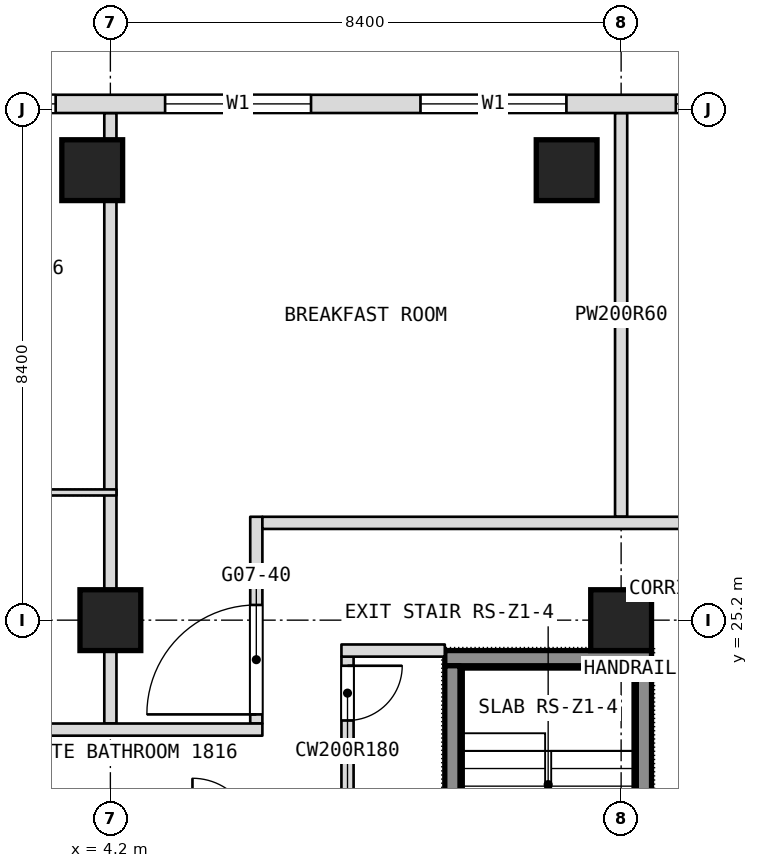
"""IFC4 building model, lengths in metres.
Left out: names, types, materials, properties, quantities, classifications, styles, units other than length and angle.
Written with IfcOpenShell. Run it as: python <this file> out.ifc"""

import sys

from ifc_helpers import new_model, si_unit, direction, frame, frame_2d, origin, origin_2d, place, context, subcontext, project, spatial, rectangle, extrude, element, fill, save


model = new_model("IFC4")
c1 = context("Model", 3, precision=1e-05, world=origin(), true_north=direction((0.0, 1.0)))
c2 = subcontext(c1, "Body", "Model", "MODEL_VIEW")
j1 = project(units=[si_unit("LENGTHUNIT", "METRE"), si_unit("PLANEANGLEUNIT", "RADIAN")], contexts=[c1])
p1 = place(None, origin())
s1 = spatial("IfcSite", under=j1, at=p1, CompositionType="ELEMENT")
p2 = place(p1, origin())
s2 = spatial("IfcBuilding", under=s1, at=p2, CompositionType="ELEMENT")
p3 = place(p2, frame((0.0, 0.0, 79.7)))
s3 = spatial("IfcBuildingStorey", under=s2, at=p3, CompositionType="ELEMENT", Elevation=79.7)
for number, where, z_axis, x_axis in (
    (1, (4.2, 25.2, 0.0), (0.0, 0.0, 1.0), (1.0, 0.0, 0.0)),
    (2, (12.6, 25.2, 0.0), (0.0, 0.0, 1.0), (1.0, 0.0, 0.0)),
    (3, (3.901, 32.6, 0.0), (0.0, 0.0, 1.0), (1.0, 0.0, 0.0)),
    (4, (11.704, 32.6, 0.0), (0.0, 0.0, 1.0), (1.0, 0.0, 0.0)),
):
    element("IfcColumn", number, at=place(p3, frame(where, z_axis=z_axis, x_axis=x_axis)), inside=s3, PredefinedType="COLUMN", context=c2, shape_type="SweptSolid", body=[
        extrude(rectangle(XDim=1.0, YDim=1.0, at=origin_2d()), origin(), (0.0, 0.0, 1.0), 3.6),
    ])
p4 = place(p3, frame((12.6, 26.9, 0.0), z_axis=(0.0, 0.0, 1.0), x_axis=(0.0, 1.0, 0.0)))
e5 = element("IfcWall", 5, at=p4, inside=s3, PredefinedType="PARTITIONING", context=c2, shape_type="SweptSolid", body=[
    extrude(rectangle(XDim=6.64, YDim=0.2, at=frame_2d((3.32, 0.0))), origin(), (0.0, 0.0, 1.0), 3.34),
])
p5 = place(p3, frame((8.1, 21.5, 0.0), z_axis=(0.0, 0.0, 1.0), x_axis=(0.0, 1.0, 0.0)))
e6 = element("IfcWall", 6, at=p5, inside=s3, PredefinedType="PARTITIONING", context=c2, shape_type="SweptSolid", body=[
    extrude(rectangle(XDim=3.1, YDim=0.2, at=frame_2d((1.55, 0.0))), origin(), (0.0, 0.0, 1.0), 3.34),
])
p6 = place(p5, frame((2.05, 0.0, 0.0)))
e7 = element("IfcOpeningElement", 7, at=p6, cuts=e6, PredefinedType="OPENING", context=c2, shape_type="SweptSolid", body=[
    extrude(rectangle(XDim=0.9, YDim=2.1, at=frame_2d((0.45, 1.05))), frame((0.0, 0.1, 0.0), z_axis=(0.0, -1.0, 0.0), x_axis=(1.0, 0.0, 0.0)), (0.0, 0.0, 1.0), 0.2),
])
p7 = place(p3, frame((6.6, 23.5, 0.0), z_axis=(0.0, 0.0, 1.0), x_axis=(0.0, 1.0, 0.0)))
e8 = element("IfcWall", 8, at=p7, inside=s3, PredefinedType="PARTITIONING", context=c2, shape_type="SweptSolid", body=[
    extrude(rectangle(XDim=3.4, YDim=0.2, at=frame_2d((1.7, 0.0))), origin(), (0.0, 0.0, 1.0), 3.34),
])
p8 = place(p7, frame((0.15, 0.0, 0.0)))
e9 = element("IfcOpeningElement", 9, at=p8, cuts=e8, PredefinedType="OPENING", context=c2, shape_type="SweptSolid", body=[
    extrude(rectangle(XDim=1.8, YDim=2.1, at=frame_2d((0.9, 1.05))), frame((0.0, 0.1, 0.0), z_axis=(0.0, -1.0, 0.0), x_axis=(1.0, 0.0, 0.0)), (0.0, 0.0, 1.0), 0.2),
])
p9 = place(p3, frame((4.2, 23.5, 0.0), z_axis=(0.0, 0.0, 1.0), x_axis=(0.0, 1.0, 0.0)))
e10 = element("IfcWall", 10, at=p9, inside=s3, PredefinedType="PARTITIONING", context=c2, shape_type="SweptSolid", body=[
    extrude(rectangle(XDim=10.04, YDim=0.2, at=frame_2d((5.02, 0.0))), origin(), (0.0, 0.0, 1.0), 3.34),
])
p10 = place(p3, frame((-16.7, 23.4, 0.0), z_axis=(0.0, 0.0, 1.0), x_axis=(1.0, 0.0, 0.0)))
e11 = element("IfcWall", 11, at=p10, inside=s3, PredefinedType="PARTITIONING", context=c2, shape_type="SweptSolid", body=[
    extrude(rectangle(XDim=23.4, YDim=0.2, at=frame_2d((11.7, 0.0))), origin(), (0.0, 0.0, 1.0), 3.34),
])
p11 = place(p10, frame((2.4, 0.0, 0.0)))
e12 = element("IfcOpeningElement", 12, at=p11, cuts=e11, PredefinedType="OPENING", context=c2, shape_type="SweptSolid", body=[
    extrude(rectangle(XDim=0.9, YDim=2.1, at=frame_2d((0.45, 1.05))), frame((0.0, 0.1, 0.0), z_axis=(0.0, -1.0, 0.0), x_axis=(1.0, 0.0, 0.0)), (0.0, 0.0, 1.0), 0.2),
])
p12 = place(p10, frame((5.65, 0.0, 0.0)))
e13 = element("IfcOpeningElement", 13, at=p12, cuts=e11, PredefinedType="OPENING", context=c2, shape_type="SweptSolid", body=[
    extrude(rectangle(XDim=1.1, YDim=2.1, at=frame_2d((0.55, 1.05))), frame((0.0, 0.1, 0.0), z_axis=(0.0, -1.0, 0.0), x_axis=(1.0, 0.0, 0.0)), (0.0, 0.0, 1.0), 0.2),
])
p13 = place(p10, frame((15.3, 0.0, 0.0)))
e14 = element("IfcOpeningElement", 14, at=p13, cuts=e11, PredefinedType="OPENING", context=c2, shape_type="SweptSolid", body=[
    extrude(rectangle(XDim=1.0, YDim=2.1, at=frame_2d((0.5, 1.05))), frame((0.0, 0.1, 0.0), z_axis=(0.0, -1.0, 0.0), x_axis=(1.0, 0.0, 0.0)), (0.0, 0.0, 1.0), 0.2),
])
p14 = place(p10, frame((17.1, 0.0, 0.0)))
e15 = element("IfcOpeningElement", 15, at=p14, cuts=e11, PredefinedType="OPENING", context=c2, shape_type="SweptSolid", body=[
    extrude(rectangle(XDim=1.0, YDim=2.1, at=frame_2d((0.5, 1.05))), frame((0.0, 0.1, 0.0), z_axis=(0.0, -1.0, 0.0), x_axis=(1.0, 0.0, 0.0)), (0.0, 0.0, 1.0), 0.2),
])
p15 = place(p3, frame((8.0, 24.7, 0.0), z_axis=(0.0, 0.0, 1.0), x_axis=(1.0, 0.0, 0.0)))
e16 = element("IfcWall", 16, at=p15, inside=s3, PredefinedType="PARTITIONING", context=c2, shape_type="SweptSolid", body=[
    extrude(rectangle(XDim=1.7, YDim=0.2, at=frame_2d((0.85, 0.0))), origin(), (0.0, 0.0, 1.0), 3.34),
])
p16 = place(p3, frame((6.7, 26.8, 0.0), z_axis=(0.0, 0.0, 1.0), x_axis=(1.0, 0.0, 0.0)))
e17 = element("IfcWall", 17, at=p16, inside=s3, PredefinedType="PARTITIONING", context=c2, shape_type="SweptSolid", body=[
    extrude(rectangle(XDim=8.0, YDim=0.2, at=frame_2d((4.0, 0.0))), origin(), (0.0, 0.0, 1.0), 3.34),
])
p17 = place(p3, frame((1.75, 27.3, 0.0), z_axis=(0.0, 0.0, 1.0), x_axis=(1.0, 0.0, 0.0)))
e18 = element("IfcWall", 18, at=p17, inside=s3, PredefinedType="PARTITIONING", context=c2, shape_type="SweptSolid", body=[
    extrude(rectangle(XDim=2.55, YDim=0.1, at=frame_2d((1.275, 0.0))), origin(), (0.0, 0.0, 1.0), 3.34),
])
p18 = place(p17, frame((0.15, 0.0, 0.0)))
e19 = element("IfcOpeningElement", 19, at=p18, cuts=e18, PredefinedType="OPENING", context=c2, shape_type="SweptSolid", body=[
    extrude(rectangle(XDim=0.9, YDim=2.1, at=frame_2d((0.45, 1.05))), frame((0.0, 0.05, 0.0), z_axis=(0.0, -1.0, 0.0), x_axis=(1.0, 0.0, 0.0)), (0.0, 0.0, 1.0), 0.1),
])
p19 = place(p3, frame((23.406, 33.69, 0.0), z_axis=(0.0, 0.0, 1.0), x_axis=(-1.0, 0.0, 0.0)))
e20 = element("IfcWall", 20, at=p19, inside=s3, PredefinedType="NOTDEFINED", context=c2, shape_type="SweptSolid", body=[
    extrude(rectangle(XDim=46.812, YDim=0.3, at=frame_2d((23.406, 0.0))), origin(), (0.0, 0.0, 1.0), 3.6),
])
p20 = place(p19, frame((2.186, 0.0, 0.9)))
e21 = element("IfcOpeningElement", 21, at=p20, cuts=e20, PredefinedType="OPENING", context=c2, shape_type="SweptSolid", body=[
    extrude(rectangle(XDim=2.4, YDim=2.1, at=frame_2d((1.2, 1.05))), frame((0.0, 0.15, 0.0), z_axis=(0.0, -1.0, 0.0), x_axis=(1.0, 0.0, 0.0)), (0.0, 0.0, 1.0), 0.3),
])
p21 = place(p19, frame((7.506, 0.0, 0.9)))
e22 = element("IfcOpeningElement", 22, at=p21, cuts=e20, PredefinedType="OPENING", context=c2, shape_type="SweptSolid", body=[
    extrude(rectangle(XDim=2.4, YDim=2.1, at=frame_2d((1.2, 1.05))), frame((0.0, 0.15, 0.0), z_axis=(0.0, -1.0, 0.0), x_axis=(1.0, 0.0, 0.0)), (0.0, 0.0, 1.0), 0.3),
])
p22 = place(p19, frame((11.706, 0.0, 0.9)))
e23 = element("IfcOpeningElement", 23, at=p22, cuts=e20, PredefinedType="OPENING", context=c2, shape_type="SweptSolid", body=[
    extrude(rectangle(XDim=2.4, YDim=2.1, at=frame_2d((1.2, 1.05))), frame((0.0, 0.15, 0.0), z_axis=(0.0, -1.0, 0.0), x_axis=(1.0, 0.0, 0.0)), (0.0, 0.0, 1.0), 0.3),
])
p23 = place(p19, frame((15.906, 0.0, 0.9)))
e24 = element("IfcOpeningElement", 24, at=p23, cuts=e20, PredefinedType="OPENING", context=c2, shape_type="SweptSolid", body=[
    extrude(rectangle(XDim=2.4, YDim=2.1, at=frame_2d((1.2, 1.05))), frame((0.0, 0.15, 0.0), z_axis=(0.0, -1.0, 0.0), x_axis=(1.0, 0.0, 0.0)), (0.0, 0.0, 1.0), 0.3),
])
p24 = place(p19, frame((20.106, 0.0, 0.9)))
e25 = element("IfcOpeningElement", 25, at=p24, cuts=e20, PredefinedType="OPENING", context=c2, shape_type="SweptSolid", body=[
    extrude(rectangle(XDim=2.4, YDim=2.1, at=frame_2d((1.2, 1.05))), frame((0.0, 0.15, 0.0), z_axis=(0.0, -1.0, 0.0), x_axis=(1.0, 0.0, 0.0)), (0.0, 0.0, 1.0), 0.3),
])
p25 = place(p19, frame((24.306, 0.0, 0.9)))
e26 = element("IfcOpeningElement", 26, at=p25, cuts=e20, PredefinedType="OPENING", context=c2, shape_type="SweptSolid", body=[
    extrude(rectangle(XDim=2.4, YDim=2.1, at=frame_2d((1.2, 1.05))), frame((0.0, 0.15, 0.0), z_axis=(0.0, -1.0, 0.0), x_axis=(1.0, 0.0, 0.0)), (0.0, 0.0, 1.0), 0.3),
])
p26 = place(p19, frame((28.506, 0.0, 0.9)))
e27 = element("IfcOpeningElement", 27, at=p26, cuts=e20, PredefinedType="OPENING", context=c2, shape_type="SweptSolid", body=[
    extrude(rectangle(XDim=2.4, YDim=2.1, at=frame_2d((1.2, 1.05))), frame((0.0, 0.15, 0.0), z_axis=(0.0, -1.0, 0.0), x_axis=(1.0, 0.0, 0.0)), (0.0, 0.0, 1.0), 0.3),
])
p27 = place(p19, frame((32.706, 0.0, 0.9)))
e28 = element("IfcOpeningElement", 28, at=p27, cuts=e20, PredefinedType="OPENING", context=c2, shape_type="SweptSolid", body=[
    extrude(rectangle(XDim=2.4, YDim=2.1, at=frame_2d((1.2, 1.05))), frame((0.0, 0.15, 0.0), z_axis=(0.0, -1.0, 0.0), x_axis=(1.0, 0.0, 0.0)), (0.0, 0.0, 1.0), 0.3),
])
p28 = place(p19, frame((36.906, 0.0, 0.9)))
e29 = element("IfcOpeningElement", 29, at=p28, cuts=e20, PredefinedType="OPENING", context=c2, shape_type="SweptSolid", body=[
    extrude(rectangle(XDim=2.4, YDim=2.1, at=frame_2d((1.2, 1.05))), frame((0.0, 0.15, 0.0), z_axis=(0.0, -1.0, 0.0), x_axis=(1.0, 0.0, 0.0)), (0.0, 0.0, 1.0), 0.3),
])
p29 = place(p19, frame((42.226, 0.0, 0.9)))
e30 = element("IfcOpeningElement", 30, at=p29, cuts=e20, PredefinedType="OPENING", context=c2, shape_type="SweptSolid", body=[
    extrude(rectangle(XDim=2.4, YDim=2.1, at=frame_2d((1.2, 1.05))), frame((0.0, 0.15, 0.0), z_axis=(0.0, -1.0, 0.0), x_axis=(1.0, 0.0, 0.0)), (0.0, 0.0, 1.0), 0.3),
])
p30 = place(p3, frame((9.7, 24.575, 0.1), z_axis=(0.0, 0.0, 1.0), x_axis=(1.0, 0.0, 0.0)))
e31 = element("IfcWall", 31, at=p30, inside=s3, PredefinedType="SHEAR", context=c2, shape_type="SweptSolid", body=[
    extrude(rectangle(XDim=3.4, YDim=0.25, at=frame_2d((1.7, 0.0))), origin(), (0.0, 0.0, 1.0), 3.6),
])
p31 = place(p3, frame((9.825, 18.75, 0.1), z_axis=(0.0, 0.0, 1.0), x_axis=(0.0, 1.0, 0.0)))
e32 = element("IfcWall", 32, at=p31, inside=s3, PredefinedType="SHEAR", context=c2, shape_type="SweptSolid", body=[
    extrude(rectangle(XDim=5.7, YDim=0.25, at=frame_2d((2.85, 0.0))), origin(), (0.0, 0.0, 1.0), 3.6),
])
p32 = place(p31, frame((0.2, 0.0, 0.0)))
e33 = element("IfcOpeningElement", 33, at=p32, cuts=e32, PredefinedType="OPENING", context=c2, shape_type="SweptSolid", body=[
    extrude(rectangle(XDim=1.0, YDim=2.1, at=frame_2d((0.5, 1.05))), frame((0.0, 0.125, 0.0), z_axis=(0.0, -1.0, 0.0), x_axis=(1.0, 0.0, 0.0)), (0.0, 0.0, 1.0), 0.25),
])
p33 = place(p3, frame((12.975, 18.75, 0.1), z_axis=(0.0, 0.0, 1.0), x_axis=(0.0, 1.0, 0.0)))
e34 = element("IfcWall", 34, at=p33, inside=s3, PredefinedType="SHEAR", context=c2, shape_type="SweptSolid", body=[
    extrude(rectangle(XDim=5.7, YDim=0.25, at=frame_2d((2.85, 0.0))), origin(), (0.0, 0.0, 1.0), 3.6),
])
p34 = place(p6, origin())
e35 = element("IfcDoor", 35, at=p34, inside=s3, OperationType="SINGLE_SWING_LEFT", PredefinedType="DOOR", context=c2, shape_type="SweptSolid", body=[
    extrude(rectangle(XDim=0.9, YDim=2.1, at=frame_2d((0.45, 1.05))), frame((0.0, 0.025, 0.0), z_axis=(0.0, -1.0, 0.0), x_axis=(1.0, 0.0, 0.0)), (0.0, 0.0, 1.0), 0.05),
])
fill(e7, e35)
p35 = place(p8, origin())
e36 = element("IfcDoor", 36, at=p35, inside=s3, OperationType="DOUBLE_DOOR_SINGLE_SWING", PredefinedType="DOOR", context=c2, shape_type="SweptSolid", body=[
    extrude(rectangle(XDim=1.8, YDim=2.1, at=frame_2d((0.9, 1.05))), frame((0.0, 0.025, 0.0), z_axis=(0.0, -1.0, 0.0), x_axis=(1.0, 0.0, 0.0)), (0.0, 0.0, 1.0), 0.05),
])
fill(e9, e36)
p36 = place(p21, origin())
e37 = element("IfcWindow", 37, at=p36, inside=s3, PartitioningType="SINGLE_PANEL", PredefinedType="WINDOW", context=c2, shape_type="SweptSolid", body=[
    extrude(rectangle(XDim=2.4, YDim=2.1, at=frame_2d((1.2, 1.05))), frame((0.0, 0.03, 0.0), z_axis=(0.0, -1.0, 0.0), x_axis=(1.0, 0.0, 0.0)), (0.0, 0.0, 1.0), 0.06),
])
fill(e22, e37)
p37 = place(p22, origin())
e38 = element("IfcWindow", 38, at=p37, inside=s3, PartitioningType="SINGLE_PANEL", PredefinedType="WINDOW", context=c2, shape_type="SweptSolid", body=[
    extrude(rectangle(XDim=2.4, YDim=2.1, at=frame_2d((1.2, 1.05))), frame((0.0, 0.03, 0.0), z_axis=(0.0, -1.0, 0.0), x_axis=(1.0, 0.0, 0.0)), (0.0, 0.0, 1.0), 0.06),
])
fill(e23, e38)
p38 = place(p23, origin())
e39 = element("IfcWindow", 39, at=p38, inside=s3, PartitioningType="SINGLE_PANEL", PredefinedType="WINDOW", context=c2, shape_type="SweptSolid", body=[
    extrude(rectangle(XDim=2.4, YDim=2.1, at=frame_2d((1.2, 1.05))), frame((0.0, 0.03, 0.0), z_axis=(0.0, -1.0, 0.0), x_axis=(1.0, 0.0, 0.0)), (0.0, 0.0, 1.0), 0.06),
])
fill(e24, e39)
p39 = place(p24, origin())
e40 = element("IfcWindow", 40, at=p39, inside=s3, PartitioningType="SINGLE_PANEL", PredefinedType="WINDOW", context=c2, shape_type="SweptSolid", body=[
    extrude(rectangle(XDim=2.4, YDim=2.1, at=frame_2d((1.2, 1.05))), frame((0.0, 0.03, 0.0), z_axis=(0.0, -1.0, 0.0), x_axis=(1.0, 0.0, 0.0)), (0.0, 0.0, 1.0), 0.06),
])
fill(e25, e40)
save(model, sys.argv[1])
